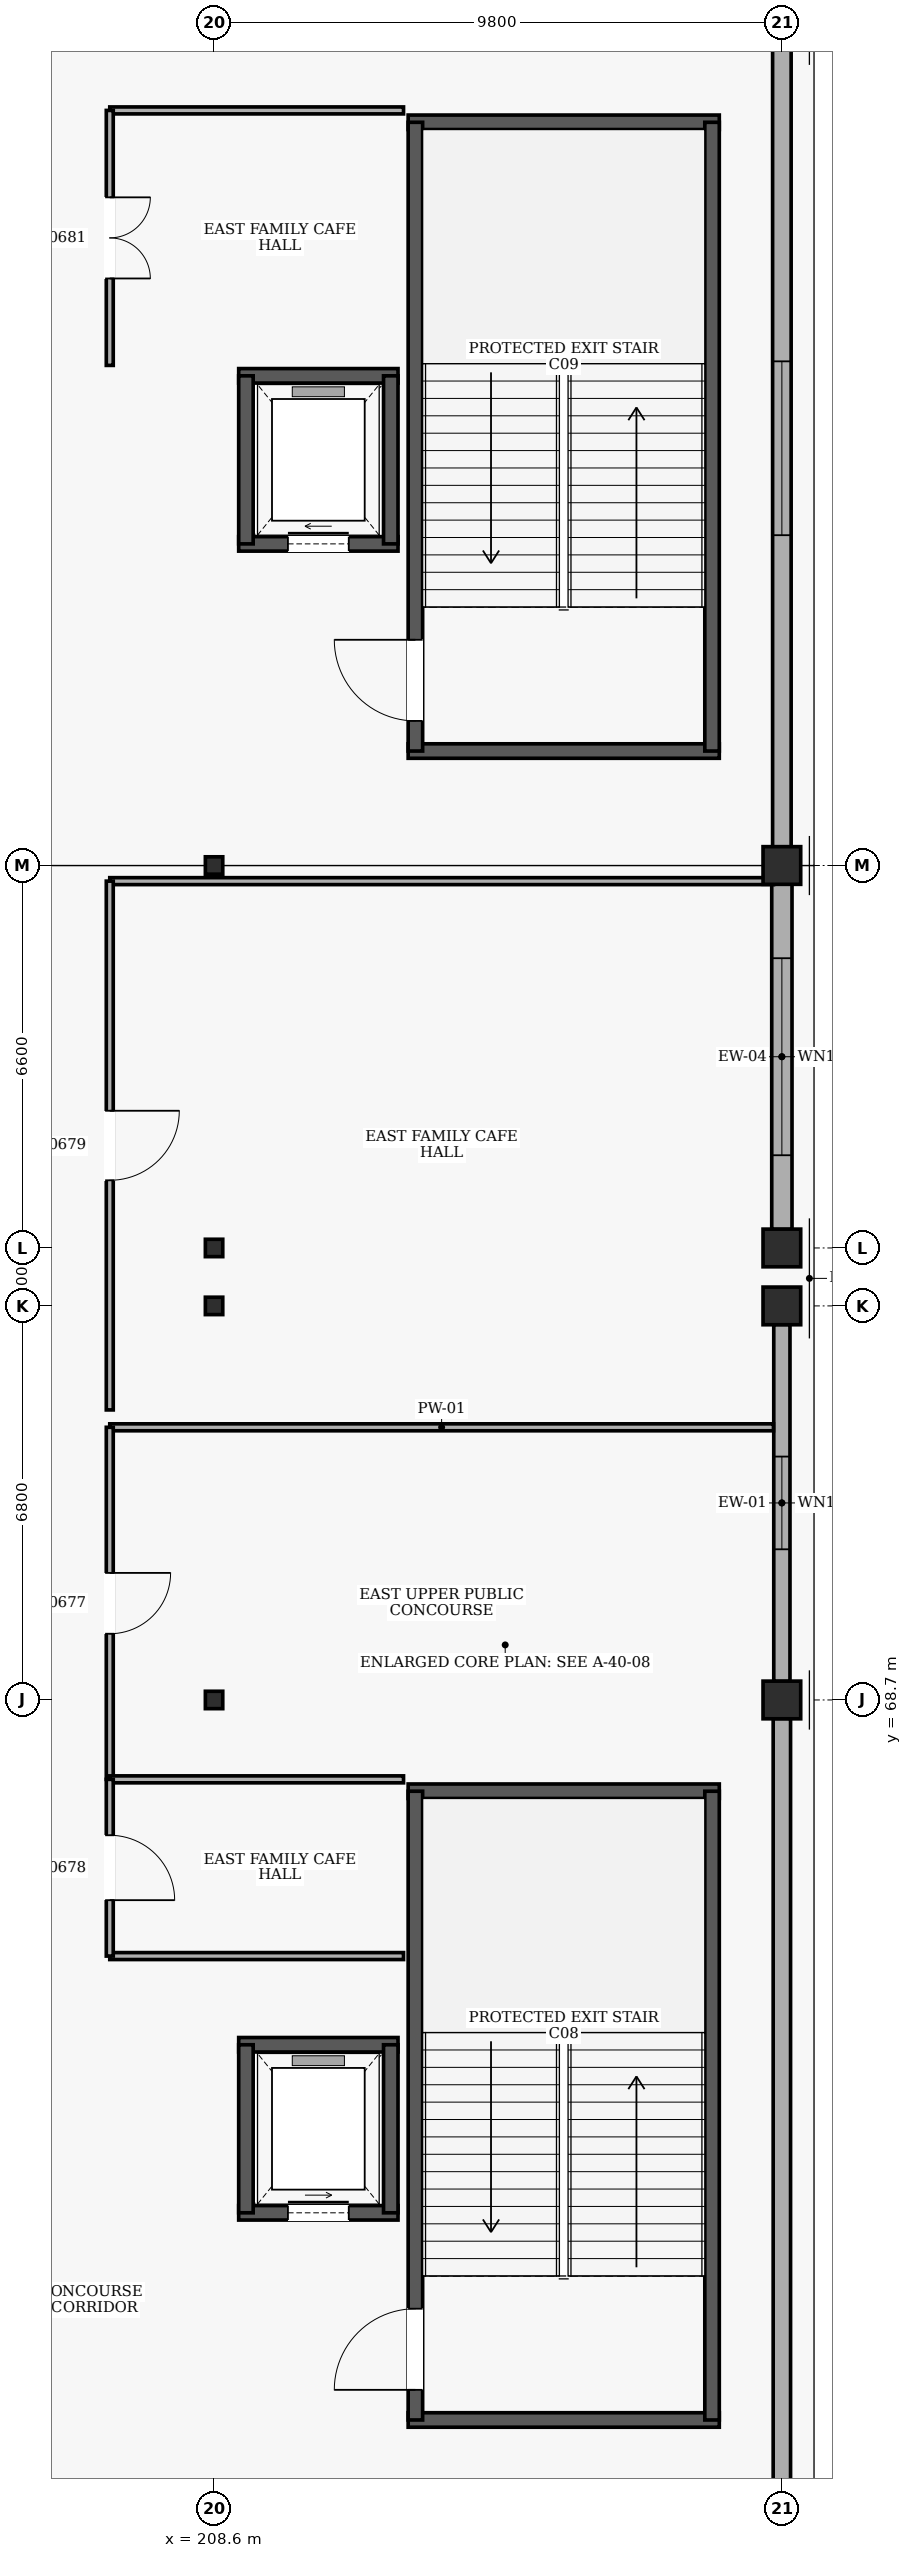
"""IFC4 building model, lengths in metres.
Left out: names, types, materials, properties, quantities, classifications, styles, units other than length and angle.
Written with IfcOpenShell. Run it as: python <this file> out.ifc"""

import sys

from ifc_helpers import new_model, si_unit, direction, frame, frame_2d, origin, origin_2d, place, context, subcontext, project, spatial, rectangle, hollow_rectangle, extrude, element, fill, save


model = new_model("IFC4")
c1 = context("Model", 3, precision=1e-05, world=origin(), true_north=direction((0.0, 1.0)))
c2 = subcontext(c1, "Body", "Model", "MODEL_VIEW")
j1 = project(units=[si_unit("LENGTHUNIT", "METRE"), si_unit("PLANEANGLEUNIT", "RADIAN")], contexts=[c1])
p1 = place(None, origin())
s1 = spatial("IfcSite", under=j1, at=p1, CompositionType="ELEMENT")
p2 = place(p1, origin())
s2 = spatial("IfcBuilding", under=s1, at=p2, CompositionType="ELEMENT")
p3 = place(p2, frame((0.0, 0.0, 15.0)))
s3 = spatial("IfcBuildingStorey", under=s2, at=p3, CompositionType="ELEMENT", Elevation=15.0)
for number, where, z_axis, x_axis in (
    (1, (208.6, 68.7, 0.0), (0.0, 0.0, 1.0), (1.0, 0.0, 0.0)),
    (2, (208.6, 75.5, 0.0), (0.0, 0.0, 1.0), (1.0, 0.0, 0.0)),
    (3, (208.6, 76.5, 0.0), (0.0, 0.0, 1.0), (1.0, 0.0, 0.0)),
    (4, (208.6, 83.1, 0.0), (0.0, 0.0, 1.0), (1.0, 0.0, 0.0)),
):
    element("IfcColumn", number, at=place(p3, frame(where, z_axis=z_axis, x_axis=x_axis)), inside=s3, PredefinedType="COLUMN", context=c2, shape_type="SweptSolid", body=[
        extrude(hollow_rectangle(XDim=0.3, YDim=0.3, WallThickness=0.016, at=origin_2d()), origin(), (0.0, 0.0, 1.0), 4.8),
    ])
for number, where, z_axis, x_axis in (
    (5, (218.4, 68.7, 0.0), (0.0, 0.0, 1.0), (1.0, 0.0, 0.0)),
    (6, (218.4, 75.5, 0.0), (0.0, 0.0, 1.0), (1.0, 0.0, 0.0)),
    (7, (218.4, 76.5, 0.0), (0.0, 0.0, 1.0), (1.0, 0.0, 0.0)),
    (8, (218.4, 83.1, 0.0), (0.0, 0.0, 1.0), (1.0, 0.0, 0.0)),
):
    element("IfcColumn", number, at=place(p3, frame(where, z_axis=z_axis, x_axis=x_axis)), inside=s3, PredefinedType="COLUMN", context=c2, shape_type="SweptSolid", body=[
        extrude(rectangle(XDim=0.65, YDim=0.65, at=origin_2d()), origin(), (0.0, 0.0, 1.0), 4.8),
    ])
p4 = place(p3, frame((218.4, 97.18, 0.0), z_axis=(0.0, 0.0, 1.0), x_axis=(0.0, -1.0, 0.0)))
e9 = element("IfcWall", 9, at=p4, inside=s3, PredefinedType="SOLIDWALL", context=c2, shape_type="SweptSolid", body=[
    extrude(rectangle(XDim=13.76, YDim=0.32, at=frame_2d((6.88, 0.0))), origin(), (0.0, 0.0, 1.0), 3.58),
])
p5 = place(p4, frame((5.38, 0.0, 0.9)))
e10 = element("IfcOpeningElement", 10, at=p5, cuts=e9, PredefinedType="OPENING", context=c2, shape_type="SweptSolid", body=[
    extrude(rectangle(XDim=3.0, YDim=2.1, at=frame_2d((1.5, 1.05))), frame((0.0, 0.17, 0.0), z_axis=(0.0, -1.0, 0.0), x_axis=(1.0, 0.0, 0.0)), (0.0, 0.0, 1.0), 0.34),
])
p6 = place(p3, frame((218.4, 82.78, 0.0), z_axis=(0.0, 0.0, 1.0), x_axis=(0.0, -1.0, 0.0)))
e11 = element("IfcWall", 11, at=p6, inside=s3, PredefinedType="SOLIDWALL", context=c2, shape_type="SweptSolid", body=[
    extrude(rectangle(XDim=5.96, YDim=0.35, at=frame_2d((2.98, 0.0))), origin(), (0.0, 0.0, 1.0), 3.98),
])
p7 = place(p6, frame((1.28, 0.0, 0.9)))
e12 = element("IfcOpeningElement", 12, at=p7, cuts=e11, PredefinedType="OPENING", context=c2, shape_type="SweptSolid", body=[
    extrude(rectangle(XDim=3.4, YDim=2.1, at=frame_2d((1.7, 1.05))), frame((0.0, 0.185, 0.0), z_axis=(0.0, -1.0, 0.0), x_axis=(1.0, 0.0, 0.0)), (0.0, 0.0, 1.0), 0.37),
])
p8 = place(p3, frame((218.4, 75.18, 0.0), z_axis=(0.0, 0.0, 1.0), x_axis=(0.0, -1.0, 0.0)))
e13 = element("IfcWall", 13, at=p8, inside=s3, PredefinedType="SOLIDWALL", context=c2, shape_type="SweptSolid", body=[
    extrude(rectangle(XDim=6.16, YDim=0.28, at=frame_2d((3.08, 0.0))), origin(), (0.0, 0.0, 1.0), 3.88),
])
p9 = place(p8, frame((2.28, 0.0, 0.9)))
e14 = element("IfcOpeningElement", 14, at=p9, cuts=e13, PredefinedType="OPENING", context=c2, shape_type="SweptSolid", body=[
    extrude(rectangle(XDim=1.6, YDim=2.4, at=frame_2d((0.8, 1.2))), frame((0.0, 0.15, 0.0), z_axis=(0.0, -1.0, 0.0), x_axis=(1.0, 0.0, 0.0)), (0.0, 0.0, 1.0), 0.3),
])
p10 = place(p3, frame((218.4, 68.38, 0.0), z_axis=(0.0, 0.0, 1.0), x_axis=(0.0, -1.0, 0.0)))
e15 = element("IfcWall", 15, at=p10, inside=s3, PredefinedType="SOLIDWALL", context=c2, shape_type="SweptSolid", body=[
    extrude(rectangle(XDim=13.76, YDim=0.3, at=frame_2d((6.88, 0.0))), origin(), (0.0, 0.0, 1.0), 3.58),
])
for number, where, z_axis, x_axis in (
    (16, (211.95, 56.275, 0.0), (0.0, 0.0, 1.0), (1.0, 0.0, 0.0)),
    (17, (217.32, 67.125, 0.0), (0.0, 0.0, 1.0), (-1.0, 0.0, 0.0)),
):
    element("IfcWall", number, at=place(p3, frame(where, z_axis=z_axis, x_axis=x_axis)), inside=s3, PredefinedType="SHEAR", context=c2, shape_type="SweptSolid", body=[
        extrude(rectangle(XDim=5.37, YDim=0.25, at=frame_2d((2.685, 0.0))), origin(), (0.0, 0.0, 1.0), 4.5),
    ])
p11 = place(p3, frame((212.075, 56.275, 0.0), z_axis=(0.0, 0.0, 1.0), x_axis=(0.0, 1.0, 0.0)))
e18 = element("IfcWall", 18, at=p11, inside=s3, PredefinedType="SHEAR", context=c2, shape_type="SweptSolid", body=[
    extrude(rectangle(XDim=10.85, YDim=0.25, at=frame_2d((5.425, 0.0))), origin(), (0.0, 0.0, 1.0), 4.5),
])
p12 = place(p11, frame((0.52, 0.0, 0.0)))
e19 = element("IfcOpeningElement", 19, at=p12, cuts=e18, PredefinedType="OPENING", context=c2, shape_type="SweptSolid", body=[
    extrude(rectangle(XDim=1.4, YDim=2.15, at=frame_2d((0.7, 1.075))), frame((0.0, 0.135, 0.0), z_axis=(0.0, -1.0, 0.0), x_axis=(1.0, 0.0, 0.0)), (0.0, 0.0, 1.0), 0.27),
])
p13 = place(p3, frame((217.195, 56.275, 0.0), z_axis=(0.0, 0.0, 1.0), x_axis=(0.0, 1.0, 0.0)))
e20 = element("IfcWall", 20, at=p13, inside=s3, PredefinedType="SHEAR", context=c2, shape_type="SweptSolid", body=[
    extrude(rectangle(XDim=10.85, YDim=0.25, at=frame_2d((5.425, 0.0))), origin(), (0.0, 0.0, 1.0), 4.5),
])
for number, where, z_axis, x_axis in (
    (21, (211.95, 85.075, 0.0), (0.0, 0.0, 1.0), (1.0, 0.0, 0.0)),
    (22, (217.32, 95.925, 0.0), (0.0, 0.0, 1.0), (-1.0, 0.0, 0.0)),
):
    element("IfcWall", number, at=place(p3, frame(where, z_axis=z_axis, x_axis=x_axis)), inside=s3, PredefinedType="SHEAR", context=c2, shape_type="SweptSolid", body=[
        extrude(rectangle(XDim=5.37, YDim=0.25, at=frame_2d((2.685, 0.0))), origin(), (0.0, 0.0, 1.0), 4.5),
    ])
p14 = place(p3, frame((212.075, 85.075, 0.0), z_axis=(0.0, 0.0, 1.0), x_axis=(0.0, 1.0, 0.0)))
e23 = element("IfcWall", 23, at=p14, inside=s3, PredefinedType="SHEAR", context=c2, shape_type="SweptSolid", body=[
    extrude(rectangle(XDim=10.85, YDim=0.25, at=frame_2d((5.425, 0.0))), origin(), (0.0, 0.0, 1.0), 4.5),
])
p15 = place(p14, frame((0.52, 0.0, 0.0)))
e24 = element("IfcOpeningElement", 24, at=p15, cuts=e23, PredefinedType="OPENING", context=c2, shape_type="SweptSolid", body=[
    extrude(rectangle(XDim=1.4, YDim=2.15, at=frame_2d((0.7, 1.075))), frame((0.0, 0.135, 0.0), z_axis=(0.0, -1.0, 0.0), x_axis=(1.0, 0.0, 0.0)), (0.0, 0.0, 1.0), 0.27),
])
p16 = place(p3, frame((217.195, 85.075, 0.0), z_axis=(0.0, 0.0, 1.0), x_axis=(0.0, 1.0, 0.0)))
e25 = element("IfcWall", 25, at=p16, inside=s3, PredefinedType="SHEAR", context=c2, shape_type="SweptSolid", body=[
    extrude(rectangle(XDim=10.85, YDim=0.25, at=frame_2d((5.425, 0.0))), origin(), (0.0, 0.0, 1.0), 4.5),
])
p17 = place(p3, frame((209.025, 59.85, 0.0), z_axis=(0.0, 0.0, 1.0), x_axis=(1.0, 0.0, 0.0)))
e26 = element("IfcWall", 26, at=p17, inside=s3, PredefinedType="SHEAR", context=c2, shape_type="SweptSolid", body=[
    extrude(rectangle(XDim=2.75, YDim=0.25, at=frame_2d((1.375, 0.0))), origin(), (0.0, 0.0, 1.0), 4.5),
])
p18 = place(p17, frame((0.85, 0.0, 0.0)))
e27 = element("IfcOpeningElement", 27, at=p18, cuts=e26, PredefinedType="OPENING", context=c2, shape_type="SweptSolid", body=[
    extrude(rectangle(XDim=1.05, YDim=2.15, at=frame_2d((0.525, 1.075))), frame((0.0, 0.135, 0.0), z_axis=(0.0, -1.0, 0.0), x_axis=(1.0, 0.0, 0.0)), (0.0, 0.0, 1.0), 0.27),
])
p19 = place(p3, frame((211.775, 62.75, 0.0), z_axis=(0.0, 0.0, 1.0), x_axis=(-1.0, 0.0, 0.0)))
e28 = element("IfcWall", 28, at=p19, inside=s3, PredefinedType="SHEAR", context=c2, shape_type="SweptSolid", body=[
    extrude(rectangle(XDim=2.75, YDim=0.25, at=frame_2d((1.375, 0.0))), origin(), (0.0, 0.0, 1.0), 4.5),
])
for number, where, z_axis, x_axis in (
    (29, (209.15, 62.75, 0.0), (0.0, 0.0, 1.0), (0.0, -1.0, 0.0)),
    (30, (211.65, 59.85, 0.0), (0.0, 0.0, 1.0), (0.0, 1.0, 0.0)),
):
    element("IfcWall", number, at=place(p3, frame(where, z_axis=z_axis, x_axis=x_axis)), inside=s3, PredefinedType="SHEAR", context=c2, shape_type="SweptSolid", body=[
        extrude(rectangle(XDim=2.9, YDim=0.25, at=frame_2d((1.45, 0.0))), origin(), (0.0, 0.0, 1.0), 4.5),
    ])
p20 = place(p3, frame((209.025, 88.65, 0.0), z_axis=(0.0, 0.0, 1.0), x_axis=(1.0, 0.0, 0.0)))
e31 = element("IfcWall", 31, at=p20, inside=s3, PredefinedType="SHEAR", context=c2, shape_type="SweptSolid", body=[
    extrude(rectangle(XDim=2.75, YDim=0.25, at=frame_2d((1.375, 0.0))), origin(), (0.0, 0.0, 1.0), 4.5),
])
p21 = place(p20, frame((0.85, 0.0, 0.0)))
e32 = element("IfcOpeningElement", 32, at=p21, cuts=e31, PredefinedType="OPENING", context=c2, shape_type="SweptSolid", body=[
    extrude(rectangle(XDim=1.05, YDim=2.15, at=frame_2d((0.525, 1.075))), frame((0.0, 0.135, 0.0), z_axis=(0.0, -1.0, 0.0), x_axis=(1.0, 0.0, 0.0)), (0.0, 0.0, 1.0), 0.27),
])
p22 = place(p3, frame((211.775, 91.55, 0.0), z_axis=(0.0, 0.0, 1.0), x_axis=(-1.0, 0.0, 0.0)))
e33 = element("IfcWall", 33, at=p22, inside=s3, PredefinedType="SHEAR", context=c2, shape_type="SweptSolid", body=[
    extrude(rectangle(XDim=2.75, YDim=0.25, at=frame_2d((1.375, 0.0))), origin(), (0.0, 0.0, 1.0), 4.5),
])
for number, where, z_axis, x_axis in (
    (34, (209.15, 91.55, 0.0), (0.0, 0.0, 1.0), (0.0, -1.0, 0.0)),
    (35, (211.65, 88.65, 0.0), (0.0, 0.0, 1.0), (0.0, 1.0, 0.0)),
):
    element("IfcWall", number, at=place(p3, frame(where, z_axis=z_axis, x_axis=x_axis)), inside=s3, PredefinedType="SHEAR", context=c2, shape_type="SweptSolid", body=[
        extrude(rectangle(XDim=2.9, YDim=0.25, at=frame_2d((1.45, 0.0))), origin(), (0.0, 0.0, 1.0), 4.5),
    ])
p23 = place(p3, frame((218.255, 73.405, 0.0), z_axis=(0.0, 0.0, 1.0), x_axis=(-1.0, 0.0, 0.0)))
e36 = element("IfcWall", 36, at=p23, inside=s3, PredefinedType="PARTITIONING", context=c2, shape_type="SweptSolid", body=[
    extrude(rectangle(XDim=11.455, YDim=0.12, at=frame_2d((5.728, 0.0))), origin(), (0.0, 0.0, 1.0), 4.5),
])
p24 = place(p3, frame((206.8, 73.405, 0.0), z_axis=(0.0, 0.0, 1.0), x_axis=(0.0, -1.0, 0.0)))
e37 = element("IfcWall", 37, at=p24, inside=s3, PredefinedType="PARTITIONING", context=c2, shape_type="SweptSolid", body=[
    extrude(rectangle(XDim=6.075, YDim=0.12, at=frame_2d((3.038, 0.0))), origin(), (0.0, 0.0, 1.0), 4.5),
])
p25 = place(p24, frame((2.513, 0.0, 0.0)))
e38 = element("IfcOpeningElement", 38, at=p25, cuts=e37, PredefinedType="OPENING", context=c2, shape_type="SweptSolid", body=[
    extrude(rectangle(XDim=1.05, YDim=2.15, at=frame_2d((0.525, 1.075))), frame((0.0, 0.07, 0.0), z_axis=(0.0, -1.0, 0.0), x_axis=(1.0, 0.0, 0.0)), (0.0, 0.0, 1.0), 0.14),
])
for number, where, z_axis, x_axis in (
    (39, (206.8, 64.281, 0.0), (0.0, 0.0, 1.0), (1.0, 0.0, 0.0)),
    (40, (211.87, 67.33, 0.0), (0.0, 0.0, 1.0), (-1.0, 0.0, 0.0)),
):
    element("IfcWall", number, at=place(p3, frame(where, z_axis=z_axis, x_axis=x_axis)), inside=s3, PredefinedType="PARTITIONING", context=c2, shape_type="SweptSolid", body=[
        extrude(rectangle(XDim=5.07, YDim=0.12, at=frame_2d((2.535, 0.0))), origin(), (0.0, 0.0, 1.0), 4.5),
    ])
p26 = place(p3, frame((206.8, 67.33, 0.0), z_axis=(0.0, 0.0, 1.0), x_axis=(0.0, -1.0, 0.0)))
e41 = element("IfcWall", 41, at=p26, inside=s3, PredefinedType="PARTITIONING", context=c2, shape_type="SweptSolid", body=[
    extrude(rectangle(XDim=3.05, YDim=0.12, at=frame_2d((1.525, 0.0))), origin(), (0.0, 0.0, 1.0), 4.5),
])
p27 = place(p26, frame((0.965, 0.0, 0.0)))
e42 = element("IfcOpeningElement", 42, at=p27, cuts=e41, PredefinedType="OPENING", context=c2, shape_type="SweptSolid", body=[
    extrude(rectangle(XDim=1.12, YDim=2.15, at=frame_2d((0.56, 1.075))), frame((0.0, 0.07, 0.0), z_axis=(0.0, -1.0, 0.0), x_axis=(1.0, 0.0, 0.0)), (0.0, 0.0, 1.0), 0.14),
])
p28 = place(p3, frame((218.255, 82.83, 0.0), z_axis=(0.0, 0.0, 1.0), x_axis=(-1.0, 0.0, 0.0)))
e43 = element("IfcWall", 43, at=p28, inside=s3, PredefinedType="PARTITIONING", context=c2, shape_type="SweptSolid", body=[
    extrude(rectangle(XDim=11.455, YDim=0.12, at=frame_2d((5.728, 0.0))), origin(), (0.0, 0.0, 1.0), 3.68),
])
p29 = place(p3, frame((206.8, 82.83, 0.0), z_axis=(0.0, 0.0, 1.0), x_axis=(0.0, -1.0, 0.0)))
e44 = element("IfcWall", 44, at=p29, inside=s3, PredefinedType="PARTITIONING", context=c2, shape_type="SweptSolid", body=[
    extrude(rectangle(XDim=9.125, YDim=0.12, at=frame_2d((4.562, 0.0))), origin(), (0.0, 0.0, 1.0), 4.5),
])
p30 = place(p29, frame((3.962, 0.0, 0.0)))
e45 = element("IfcOpeningElement", 45, at=p30, cuts=e44, PredefinedType="OPENING", context=c2, shape_type="SweptSolid", body=[
    extrude(rectangle(XDim=1.2, YDim=2.15, at=frame_2d((0.6, 1.075))), frame((0.0, 0.07, 0.0), z_axis=(0.0, -1.0, 0.0), x_axis=(1.0, 0.0, 0.0)), (0.0, 0.0, 1.0), 0.14),
])
p31 = place(p3, frame((211.87, 96.13, 0.0), z_axis=(0.0, 0.0, 1.0), x_axis=(-1.0, 0.0, 0.0)))
e46 = element("IfcWall", 46, at=p31, inside=s3, PredefinedType="PARTITIONING", context=c2, shape_type="SweptSolid", body=[
    extrude(rectangle(XDim=5.07, YDim=0.12, at=frame_2d((2.535, 0.0))), origin(), (0.0, 0.0, 1.0), 4.5),
])
p32 = place(p3, frame((206.8, 96.13, 0.0), z_axis=(0.0, 0.0, 1.0), x_axis=(0.0, -1.0, 0.0)))
e47 = element("IfcWall", 47, at=p32, inside=s3, PredefinedType="PARTITIONING", context=c2, shape_type="SweptSolid", body=[
    extrude(rectangle(XDim=4.4, YDim=0.12, at=frame_2d((2.2, 0.0))), origin(), (0.0, 0.0, 1.0), 4.5),
])
p33 = place(p32, frame((1.5, 0.0, 0.0)))
e48 = element("IfcOpeningElement", 48, at=p33, cuts=e47, PredefinedType="OPENING", context=c2, shape_type="SweptSolid", body=[
    extrude(rectangle(XDim=1.4, YDim=2.2, at=frame_2d((0.7, 1.1))), frame((0.0, 0.07, 0.0), z_axis=(0.0, -1.0, 0.0), x_axis=(1.0, 0.0, 0.0)), (0.0, 0.0, 1.0), 0.14),
])
p34 = place(p5, origin())
e49 = element("IfcWindow", 49, at=p34, inside=s3, PartitioningType="SINGLE_PANEL", PredefinedType="WINDOW", context=c2, shape_type="SweptSolid", body=[
    extrude(rectangle(XDim=3.0, YDim=2.1, at=frame_2d((1.5, 1.05))), frame((0.0, 0.03, 0.0), z_axis=(0.0, -1.0, 0.0), x_axis=(1.0, 0.0, 0.0)), (0.0, 0.0, 1.0), 0.06),
])
fill(e10, e49)
p35 = place(p7, origin())
e50 = element("IfcWindow", 50, at=p35, inside=s3, PartitioningType="SINGLE_PANEL", PredefinedType="WINDOW", context=c2, shape_type="SweptSolid", body=[
    extrude(rectangle(XDim=3.4, YDim=2.1, at=frame_2d((1.7, 1.05))), frame((0.0, 0.03, 0.0), z_axis=(0.0, -1.0, 0.0), x_axis=(1.0, 0.0, 0.0)), (0.0, 0.0, 1.0), 0.06),
])
fill(e12, e50)
p36 = place(p9, origin())
e51 = element("IfcWindow", 51, at=p36, inside=s3, PartitioningType="SINGLE_PANEL", PredefinedType="WINDOW", context=c2, shape_type="SweptSolid", body=[
    extrude(rectangle(XDim=1.6, YDim=2.4, at=frame_2d((0.8, 1.2))), frame((0.0, 0.03, 0.0), z_axis=(0.0, -1.0, 0.0), x_axis=(1.0, 0.0, 0.0)), (0.0, 0.0, 1.0), 0.06),
])
fill(e14, e51)
p37 = place(p12, frame((1.4, 0.0, 0.0), z_axis=(0.0, 0.0, 1.0), x_axis=(-1.0, 0.0, 0.0)))
e52 = element("IfcDoor", 52, at=p37, inside=s3, OperationType="SINGLE_SWING_RIGHT", PredefinedType="DOOR", context=c2, shape_type="SweptSolid", body=[
    extrude(rectangle(XDim=1.4, YDim=2.15, at=frame_2d((0.7, 1.075))), frame((0.0, 0.025, 0.0), z_axis=(0.0, -1.0, 0.0), x_axis=(1.0, 0.0, 0.0)), (0.0, 0.0, 1.0), 0.05),
])
fill(e19, e52)
p38 = place(p15, frame((1.4, 0.0, 0.0), z_axis=(0.0, 0.0, 1.0), x_axis=(-1.0, 0.0, 0.0)))
e53 = element("IfcDoor", 53, at=p38, inside=s3, OperationType="SINGLE_SWING_LEFT", PredefinedType="DOOR", context=c2, shape_type="SweptSolid", body=[
    extrude(rectangle(XDim=1.4, YDim=2.15, at=frame_2d((0.7, 1.075))), frame((0.0, 0.025, 0.0), z_axis=(0.0, -1.0, 0.0), x_axis=(1.0, 0.0, 0.0)), (0.0, 0.0, 1.0), 0.05),
])
fill(e24, e53)
p39 = place(p18, origin())
e54 = element("IfcDoor", 54, at=p39, inside=s3, OperationType="SLIDING_TO_LEFT", PredefinedType="DOOR", context=c2, shape_type="SweptSolid", body=[
    extrude(rectangle(XDim=1.05, YDim=2.15, at=frame_2d((0.525, 1.075))), frame((0.0, 0.025, 0.0), z_axis=(0.0, -1.0, 0.0), x_axis=(1.0, 0.0, 0.0)), (0.0, 0.0, 1.0), 0.05),
])
fill(e27, e54)
p40 = place(p21, origin())
e55 = element("IfcDoor", 55, at=p40, inside=s3, OperationType="SLIDING_TO_RIGHT", PredefinedType="DOOR", context=c2, shape_type="SweptSolid", body=[
    extrude(rectangle(XDim=1.05, YDim=2.15, at=frame_2d((0.525, 1.075))), frame((0.0, 0.025, 0.0), z_axis=(0.0, -1.0, 0.0), x_axis=(1.0, 0.0, 0.0)), (0.0, 0.0, 1.0), 0.05),
])
fill(e32, e55)
p41 = place(p25, origin())
e56 = element("IfcDoor", 56, at=p41, inside=s3, OperationType="SINGLE_SWING_LEFT", PredefinedType="DOOR", context=c2, shape_type="SweptSolid", body=[
    extrude(rectangle(XDim=1.05, YDim=2.15, at=frame_2d((0.525, 1.075))), frame((0.0, 0.025, 0.0), z_axis=(0.0, -1.0, 0.0), x_axis=(1.0, 0.0, 0.0)), (0.0, 0.0, 1.0), 0.05),
])
fill(e38, e56)
p42 = place(p27, origin())
e57 = element("IfcDoor", 57, at=p42, inside=s3, OperationType="SINGLE_SWING_RIGHT", PredefinedType="DOOR", context=c2, shape_type="SweptSolid", body=[
    extrude(rectangle(XDim=1.12, YDim=2.15, at=frame_2d((0.56, 1.075))), frame((0.0, 0.025, 0.0), z_axis=(0.0, -1.0, 0.0), x_axis=(1.0, 0.0, 0.0)), (0.0, 0.0, 1.0), 0.05),
])
fill(e42, e57)
p43 = place(p30, origin())
e58 = element("IfcDoor", 58, at=p43, inside=s3, OperationType="SINGLE_SWING_LEFT", PredefinedType="DOOR", context=c2, shape_type="SweptSolid", body=[
    extrude(rectangle(XDim=1.2, YDim=2.15, at=frame_2d((0.6, 1.075))), frame((0.0, 0.025, 0.0), z_axis=(0.0, -1.0, 0.0), x_axis=(1.0, 0.0, 0.0)), (0.0, 0.0, 1.0), 0.05),
])
fill(e45, e58)
p44 = place(p33, origin())
e59 = element("IfcDoor", 59, at=p44, inside=s3, OperationType="DOUBLE_DOOR_SINGLE_SWING", PredefinedType="DOOR", context=c2, shape_type="SweptSolid", body=[
    extrude(rectangle(XDim=1.4, YDim=2.2, at=frame_2d((0.7, 1.1))), frame((0.0, 0.025, 0.0), z_axis=(0.0, -1.0, 0.0), x_axis=(1.0, 0.0, 0.0)), (0.0, 0.0, 1.0), 0.05),
])
fill(e48, e59)
save(model, sys.argv[1])
